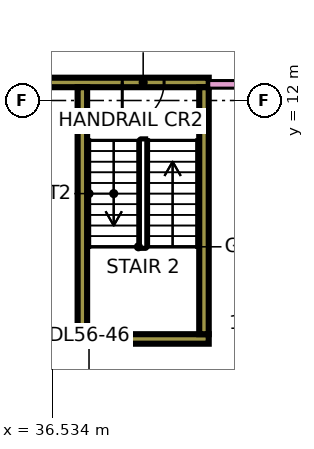
"""IFC4 building model, lengths in metres.
Left out: names, types, materials, properties, quantities, classifications, styles, units other than length and angle.
Written with IfcOpenShell. Run it as: python <this file> out.ifc"""

import sys

from ifc_helpers import new_model, si_unit, direction, frame, frame_2d, origin, place, context, subcontext, project, spatial, rectangle, extrude, element, fill, save


model = new_model("IFC4")
c1 = context("Model", 3, precision=1e-05, world=origin(), true_north=direction((0.0, 1.0)))
c2 = subcontext(c1, "Body", "Model", "MODEL_VIEW")
j1 = project(units=[si_unit("LENGTHUNIT", "METRE"), si_unit("PLANEANGLEUNIT", "RADIAN")], contexts=[c1])
p1 = place(None, origin())
s1 = spatial("IfcSite", under=j1, at=p1, CompositionType="ELEMENT")
p2 = place(p1, origin())
s2 = spatial("IfcBuilding", under=s1, at=p2, CompositionType="ELEMENT")
p3 = place(p2, frame((0.0, 0.0, 237.9)))
s3 = spatial("IfcBuildingStorey", under=s2, at=p3, CompositionType="ELEMENT", Elevation=237.9)
p4 = place(p3, frame((37.2, 5.725, 0.0), z_axis=(0.0, 0.0, 1.0), x_axis=(1.0, 0.0, 0.0)))
e1 = element("IfcWall", 1, at=p4, inside=s3, PredefinedType="SHEAR", context=c2, shape_type="SweptSolid", body=[
    extrude(rectangle(XDim=3.45, YDim=0.25, at=frame_2d((1.725, 0.0))), origin(), (0.0, 0.0, 1.0), 3.75),
])
p5 = place(p3, frame((36.425, 12.475, 0.0), z_axis=(0.0, 0.0, 1.0), x_axis=(1.0, 0.0, 0.0)))
e2 = element("IfcWall", 2, at=p5, inside=s3, PredefinedType="SHEAR", context=c2, shape_type="SweptSolid", body=[
    extrude(rectangle(XDim=4.225, YDim=0.25, at=frame_2d((2.112, 0.0))), origin(), (0.0, 0.0, 1.0), 3.75),
])
p6 = place(p5, frame((1.95, 0.0, 0.0)))
e3 = element("IfcOpeningElement", 3, at=p6, cuts=e2, PredefinedType="OPENING", context=c2, shape_type="SweptSolid", body=[
    extrude(rectangle(XDim=1.1, YDim=2.2, at=frame_2d((0.55, 1.1))), frame((0.0, 0.135, 0.0), z_axis=(0.0, -1.0, 0.0), x_axis=(1.0, 0.0, 0.0)), (0.0, 0.0, 1.0), 0.27),
])
for number, where, z_axis, x_axis in (
    (4, (37.325, 5.85, 0.0), (0.0, 0.0, 1.0), (0.0, 1.0, 0.0)),
    (5, (40.525, 5.85, 0.0), (0.0, 0.0, 1.0), (0.0, 1.0, 0.0)),
):
    element("IfcWall", number, at=place(p3, frame(where, z_axis=z_axis, x_axis=x_axis)), inside=s3, PredefinedType="SHEAR", context=c2, shape_type="SweptSolid", body=[
        extrude(rectangle(XDim=6.5, YDim=0.25, at=frame_2d((3.25, 0.0))), origin(), (0.0, 0.0, 1.0), 3.75),
    ])
p7 = place(p3, frame((40.65, 12.425, 0.0), z_axis=(0.0, 0.0, 1.0), x_axis=(1.0, 0.0, 0.0)))
e6 = element("IfcWall", 6, at=p7, inside=s3, PredefinedType="PARTITIONING", context=c2, shape_type="SweptSolid", body=[
    extrude(rectangle(XDim=22.35, YDim=0.2, at=frame_2d((11.175, 0.0))), origin(), (0.0, 0.0, 1.0), 3.35),
])
p8 = place(p7, frame((14.7, 0.0, 0.0)))
e7 = element("IfcOpeningElement", 7, at=p8, cuts=e6, PredefinedType="OPENING", context=c2, shape_type="SweptSolid", body=[
    extrude(rectangle(XDim=1.0, YDim=2.1, at=frame_2d((0.5, 1.05))), frame((0.0, 0.11, 0.0), z_axis=(0.0, -1.0, 0.0), x_axis=(1.0, 0.0, 0.0)), (0.0, 0.0, 1.0), 0.22),
])
p9 = place(p7, frame((1.05, 0.0, 0.0)))
e8 = element("IfcOpeningElement", 8, at=p9, cuts=e6, PredefinedType="OPENING", context=c2, shape_type="SweptSolid", body=[
    extrude(rectangle(XDim=1.0, YDim=2.1, at=frame_2d((0.5, 1.05))), frame((0.0, 0.11, 0.0), z_axis=(0.0, -1.0, 0.0), x_axis=(1.0, 0.0, 0.0)), (0.0, 0.0, 1.0), 0.22),
])
p10 = place(p6, frame((1.1, 0.0, 0.0), z_axis=(0.0, 0.0, 1.0), x_axis=(-1.0, 0.0, 0.0)))
e9 = element("IfcDoor", 9, at=p10, inside=s3, OperationType="SINGLE_SWING_LEFT", PredefinedType="DOOR", context=c2, shape_type="SweptSolid", body=[
    extrude(rectangle(XDim=1.1, YDim=2.2, at=frame_2d((0.55, 1.1))), frame((0.0, 0.025, 0.0), z_axis=(0.0, -1.0, 0.0), x_axis=(1.0, 0.0, 0.0)), (0.0, 0.0, 1.0), 0.05),
])
fill(e3, e9)
save(model, sys.argv[1])
